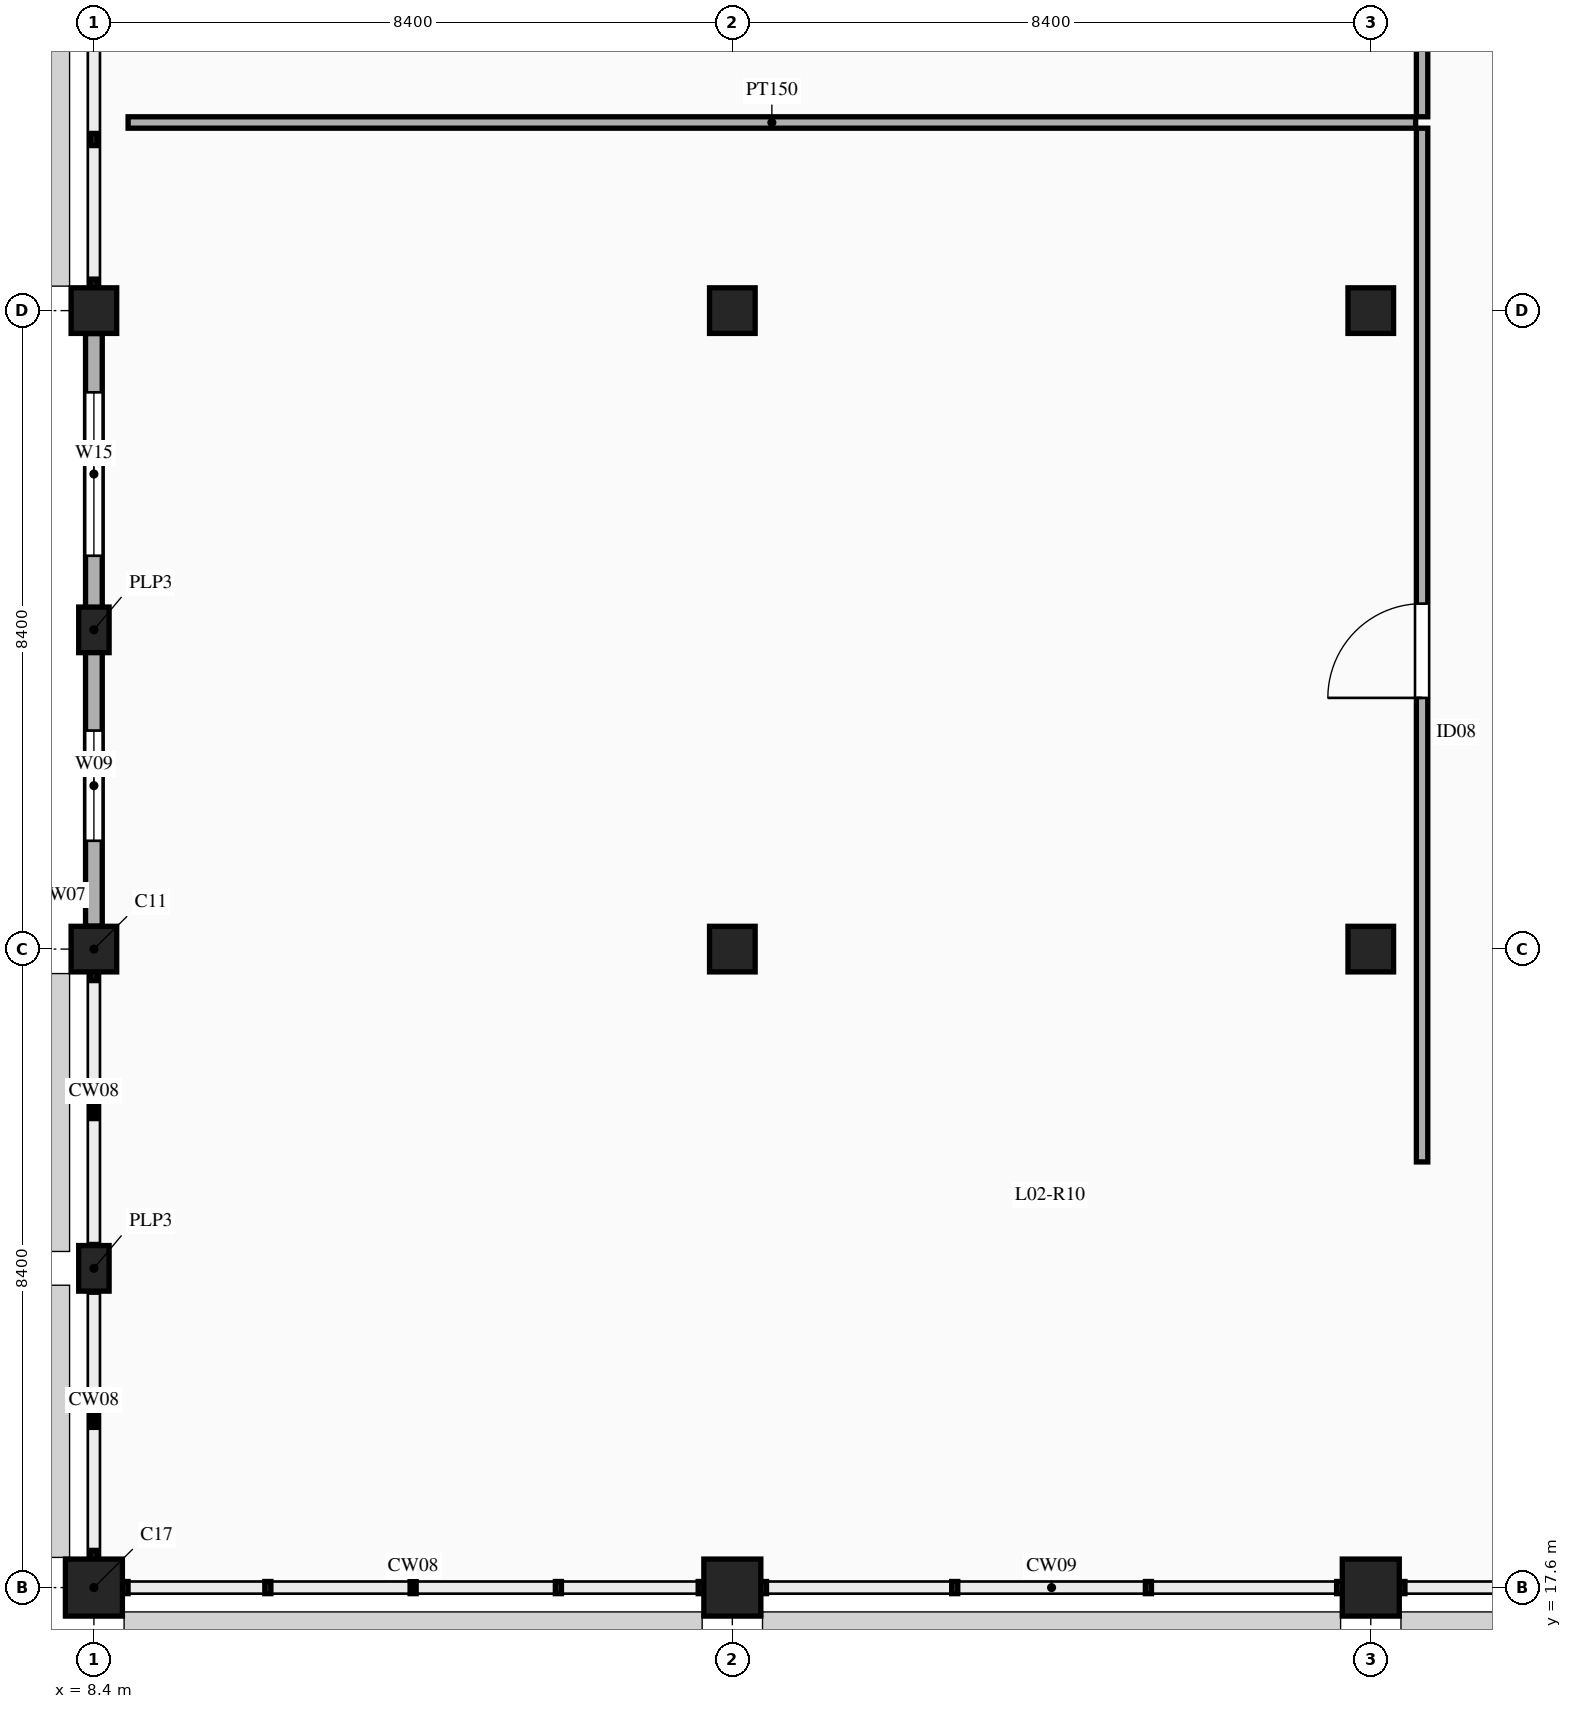
"""IFC4 building model, lengths in metres.
Left out: names, types, materials, properties, quantities, classifications, styles, units other than length and angle.
Written with IfcOpenShell. Run it as: python <this file> out.ifc"""

import sys

from ifc_helpers import new_model, si_unit, direction, frame, frame_2d, origin, origin_2d, place, context, subcontext, project, spatial, rectangle, circle, extrude, element, fill, save


model = new_model("IFC4")
c1 = context("Model", 3, precision=1e-05, world=origin(), true_north=direction((0.0, 1.0)))
c2 = subcontext(c1, "Body", "Model", "MODEL_VIEW")
j1 = project(units=[si_unit("LENGTHUNIT", "METRE"), si_unit("PLANEANGLEUNIT", "RADIAN")], contexts=[c1])
p1 = place(None, origin())
s1 = spatial("IfcSite", under=j1, at=p1, CompositionType="ELEMENT")
p2 = place(p1, origin())
s2 = spatial("IfcBuilding", under=s1, at=p2, CompositionType="ELEMENT")
p3 = place(p2, frame((0.0, 0.0, 10.2)))
s3 = spatial("IfcBuildingStorey", under=s2, at=p3, CompositionType="ELEMENT", Elevation=10.2)
p4 = place(p3, frame((8.4, 17.6, 0.0), z_axis=(0.0, 0.0, 1.0), x_axis=(1.0, 0.0, 0.0)))
e1 = element("IfcColumn", 1, at=p4, inside=s3, PredefinedType="COLUMN", context=c2, shape_type="SweptSolid", body=[
    extrude(circle(Radius=0.375, at=origin_2d()), origin(), (0.0, 0.0, 1.0), 4.8),
])
for number, where, z_axis, x_axis in (
    (2, (8.4, 26.0, 0.0), (0.0, 0.0, 1.0), (1.0, 0.0, 0.0)),
    (3, (8.4, 34.4, 0.0), (0.0, 0.0, 1.0), (1.0, 0.0, 0.0)),
):
    element("IfcColumn", number, at=place(p3, frame(where, z_axis=z_axis, x_axis=x_axis)), inside=s3, PredefinedType="COLUMN", context=c2, shape_type="SweptSolid", body=[
        extrude(rectangle(XDim=0.6, YDim=0.6, at=origin_2d()), origin(), (0.0, 0.0, 1.0), 4.8),
    ])
p5 = place(p3, frame((16.8, 17.6, 0.0), z_axis=(0.0, 0.0, 1.0), x_axis=(1.0, 0.0, 0.0)))
e4 = element("IfcColumn", 4, at=p5, inside=s3, PredefinedType="COLUMN", context=c2, shape_type="SweptSolid", body=[
    extrude(circle(Radius=0.375, at=origin_2d()), origin(), (0.0, 0.0, 1.0), 4.8),
])
for number, where, z_axis, x_axis in (
    (5, (16.8, 26.0, 0.0), (0.0, 0.0, 1.0), (1.0, 0.0, 0.0)),
    (6, (16.8, 34.4, 0.0), (0.0, 0.0, 1.0), (1.0, 0.0, 0.0)),
):
    element("IfcColumn", number, at=place(p3, frame(where, z_axis=z_axis, x_axis=x_axis)), inside=s3, PredefinedType="COLUMN", context=c2, shape_type="SweptSolid", body=[
        extrude(rectangle(XDim=0.6, YDim=0.6, at=origin_2d()), origin(), (0.0, 0.0, 1.0), 4.8),
    ])
p6 = place(p3, frame((25.2, 17.6, 0.0), z_axis=(0.0, 0.0, 1.0), x_axis=(1.0, 0.0, 0.0)))
e7 = element("IfcColumn", 7, at=p6, inside=s3, PredefinedType="COLUMN", context=c2, shape_type="SweptSolid", body=[
    extrude(circle(Radius=0.375, at=origin_2d()), origin(), (0.0, 0.0, 1.0), 4.8),
])
for number, where, z_axis, x_axis in (
    (8, (25.2, 26.0, 0.0), (0.0, 0.0, 1.0), (1.0, 0.0, 0.0)),
    (9, (25.2, 34.4, 0.0), (0.0, 0.0, 1.0), (1.0, 0.0, 0.0)),
):
    element("IfcColumn", number, at=place(p3, frame(where, z_axis=z_axis, x_axis=x_axis)), inside=s3, PredefinedType="COLUMN", context=c2, shape_type="SweptSolid", body=[
        extrude(rectangle(XDim=0.6, YDim=0.6, at=origin_2d()), origin(), (0.0, 0.0, 1.0), 4.8),
    ])
for number, where, z_axis, x_axis in (
    (10, (8.4, 21.8, 0.0), (0.0, 0.0, 1.0), (1.0, 0.0, 0.0)),
    (11, (8.4, 30.2, 0.0), (0.0, 0.0, 1.0), (1.0, 0.0, 0.0)),
):
    element("IfcColumn", number, at=place(p3, frame(where, z_axis=z_axis, x_axis=x_axis)), inside=s3, PredefinedType="PILASTER", context=c2, shape_type="SweptSolid", body=[
        extrude(rectangle(XDim=0.6, YDim=0.4, at=origin_2d()), origin(), (0.0, 0.0, 1.0), 4.8),
    ])
p7 = place(p3, frame((8.4, 26.302, 0.0), z_axis=(0.0, 0.0, 1.0), x_axis=(0.0, 1.0, 0.0)))
e12 = element("IfcWall", 12, at=p7, inside=s3, PredefinedType="USERDEFINED", context=c2, shape_type="SweptSolid", body=[
    extrude(rectangle(XDim=3.696, YDim=0.22, at=frame_2d((1.848, 0.0))), origin(), (0.0, 0.0, 1.0), 3.85),
])
p8 = place(p7, frame((1.123, 0.0, 0.9)))
e13 = element("IfcOpeningElement", 13, at=p8, cuts=e12, PredefinedType="OPENING", context=c2, shape_type="SweptSolid", body=[
    extrude(rectangle(XDim=1.45, YDim=1.8, at=frame_2d((0.725, 0.9))), frame((0.0, 0.12, 0.0), z_axis=(0.0, -1.0, 0.0), x_axis=(1.0, 0.0, 0.0)), (0.0, 0.0, 1.0), 0.24),
])
p9 = place(p3, frame((8.4, 30.402, 0.0), z_axis=(0.0, 0.0, 1.0), x_axis=(0.0, 1.0, 0.0)))
e14 = element("IfcWall", 14, at=p9, inside=s3, PredefinedType="USERDEFINED", context=c2, shape_type="SweptSolid", body=[
    extrude(rectangle(XDim=3.696, YDim=0.22, at=frame_2d((1.848, 0.0))), origin(), (0.0, 0.0, 1.0), 3.85),
])
p10 = place(p9, frame((0.773, 0.0, 1.1)))
e15 = element("IfcOpeningElement", 15, at=p10, cuts=e14, PredefinedType="OPENING", context=c2, shape_type="SweptSolid", body=[
    extrude(rectangle(XDim=2.15, YDim=2.15, at=frame_2d((1.075, 1.075))), frame((0.0, 0.12, 0.0), z_axis=(0.0, -1.0, 0.0), x_axis=(1.0, 0.0, 0.0)), (0.0, 0.0, 1.0), 0.24),
])
p11 = place(p3, frame((25.875, 23.2, 0.0), z_axis=(0.0, 0.0, 1.0), x_axis=(0.0, 1.0, 0.0)))
e16 = element("IfcWall", 16, at=p11, inside=s3, PredefinedType="PARTITIONING", context=c2, shape_type="SweptSolid", body=[
    extrude(rectangle(XDim=13.6, YDim=0.15, at=frame_2d((6.8, 0.0))), origin(), (0.0, 0.0, 1.0), 3.75),
])
p12 = place(p11, frame((6.105, 0.0, 0.0)))
e17 = element("IfcOpeningElement", 17, at=p12, cuts=e16, PredefinedType="OPENING", context=c2, shape_type="SweptSolid", body=[
    extrude(rectangle(XDim=1.24, YDim=2.2, at=frame_2d((0.62, 1.1))), frame((0.0, 0.085, 0.0), z_axis=(0.0, -1.0, 0.0), x_axis=(1.0, 0.0, 0.0)), (0.0, 0.0, 1.0), 0.17),
])
p13 = place(p3, frame((25.875, 36.95, 0.0), z_axis=(0.0, 0.0, 1.0), x_axis=(0.0, 1.0, 0.0)))
e18 = element("IfcWall", 18, at=p13, inside=s3, PredefinedType="PARTITIONING", context=c2, shape_type="SweptSolid", body=[
    extrude(rectangle(XDim=18.65, YDim=0.15, at=frame_2d((9.325, 0.0))), origin(), (0.0, 0.0, 1.0), 3.75),
])
p14 = place(p13, frame((15.963, 0.0, 0.0)))
e19 = element("IfcOpeningElement", 19, at=p14, cuts=e18, PredefinedType="OPENING", context=c2, shape_type="SweptSolid", body=[
    extrude(rectangle(XDim=1.24, YDim=2.2, at=frame_2d((0.62, 1.1))), frame((0.0, 0.085, 0.0), z_axis=(0.0, -1.0, 0.0), x_axis=(1.0, 0.0, 0.0)), (0.0, 0.0, 1.0), 0.17),
])
p15 = place(p3, frame((8.85, 36.875, 0.0), z_axis=(0.0, 0.0, 1.0), x_axis=(1.0, 0.0, 0.0)))
e20 = element("IfcWall", 20, at=p15, inside=s3, PredefinedType="PARTITIONING", context=c2, shape_type="SweptSolid", body=[
    extrude(rectangle(XDim=16.94, YDim=0.15, at=frame_2d((8.47, 0.0))), origin(), (0.0, 0.0, 1.0), 3.75),
])
p16 = place(p8, origin())
e21 = element("IfcWindow", 21, at=p16, inside=s3, PartitioningType="DOUBLE_PANEL_HORIZONTAL", PredefinedType="WINDOW", context=c2, shape_type="SweptSolid", body=[
    extrude(rectangle(XDim=1.45, YDim=1.8, at=frame_2d((0.725, 0.9))), frame((0.0, 0.03, 0.0), z_axis=(0.0, -1.0, 0.0), x_axis=(1.0, 0.0, 0.0)), (0.0, 0.0, 1.0), 0.06),
])
fill(e13, e21)
p17 = place(p10, origin())
e22 = element("IfcWindow", 22, at=p17, inside=s3, PartitioningType="TRIPLE_PANEL_VERTICAL", PredefinedType="WINDOW", context=c2, shape_type="SweptSolid", body=[
    extrude(rectangle(XDim=2.15, YDim=2.15, at=frame_2d((1.075, 1.075))), frame((0.0, 0.03, 0.0), z_axis=(0.0, -1.0, 0.0), x_axis=(1.0, 0.0, 0.0)), (0.0, 0.0, 1.0), 0.06),
])
fill(e15, e22)
p18 = place(p12, origin())
e23 = element("IfcDoor", 23, at=p18, inside=s3, OperationType="SINGLE_SWING_LEFT", PredefinedType="DOOR", context=c2, shape_type="SweptSolid", body=[
    extrude(rectangle(XDim=1.24, YDim=2.2, at=frame_2d((0.62, 1.1))), frame((0.0, 0.025, 0.0), z_axis=(0.0, -1.0, 0.0), x_axis=(1.0, 0.0, 0.0)), (0.0, 0.0, 1.0), 0.05),
])
fill(e17, e23)
save(model, sys.argv[1])
